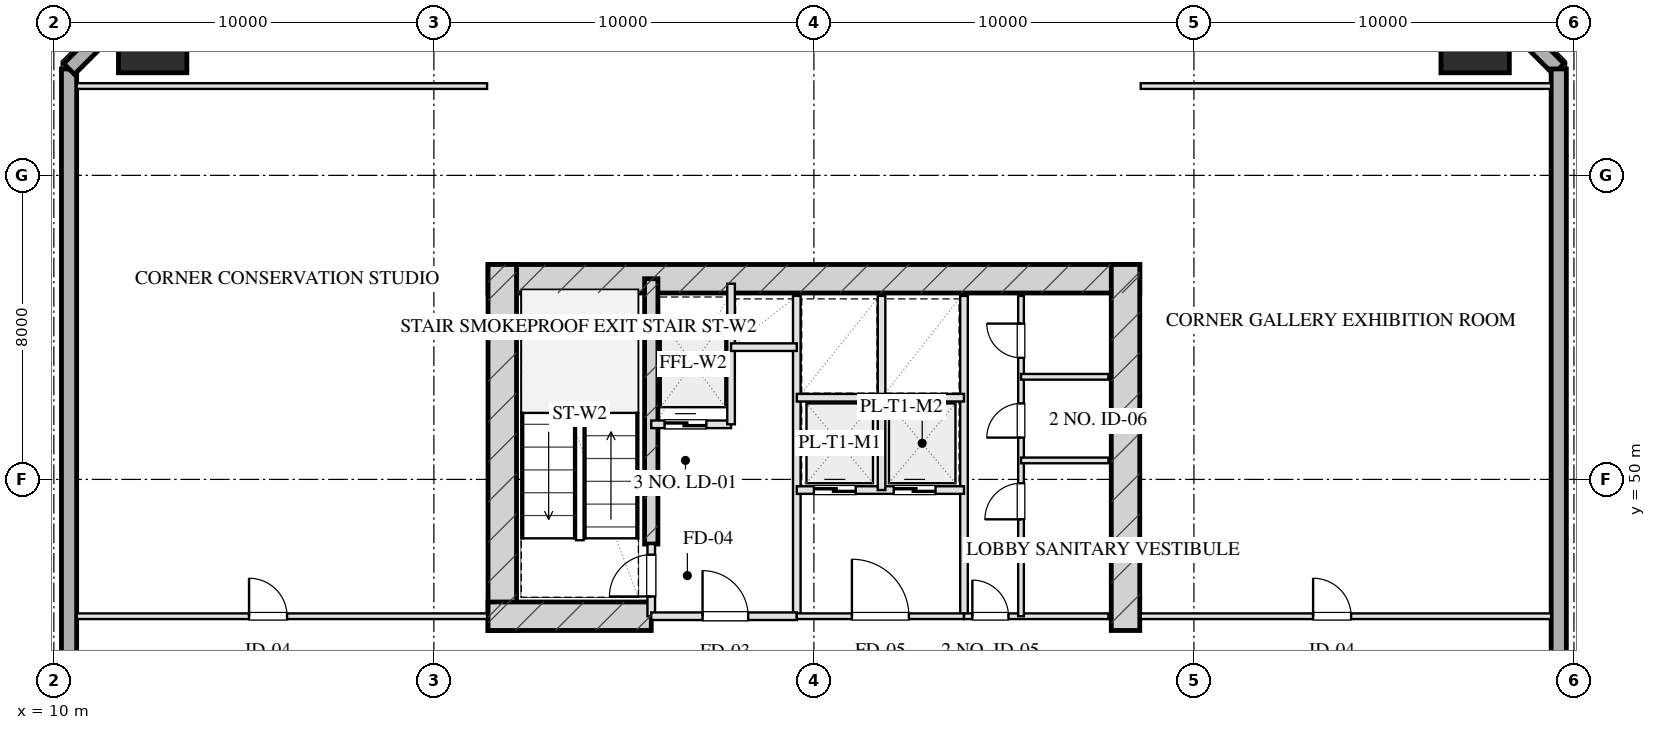
"""IFC4 building model, lengths in metres.
Left out: names, types, materials, properties, quantities, classifications, styles, units other than length and angle.
Written with IfcOpenShell. Run it as: python <this file> out.ifc"""

import sys

from ifc_helpers import new_model, si_unit, direction, frame, frame_2d, origin, origin_2d, place, context, subcontext, project, spatial, rectangle, hollow_rectangle, extrude, element, fill, save


model = new_model("IFC4")
c1 = context("Model", 3, precision=1e-05, world=origin(), true_north=direction((0.0, 1.0)))
c2 = subcontext(c1, "Body", "Model", "MODEL_VIEW")
j1 = project(units=[si_unit("LENGTHUNIT", "METRE"), si_unit("PLANEANGLEUNIT", "RADIAN")], contexts=[c1])
p1 = place(None, origin())
s1 = spatial("IfcSite", under=j1, at=p1, CompositionType="ELEMENT")
p2 = place(p1, origin())
s2 = spatial("IfcBuilding", under=s1, at=p2, CompositionType="ELEMENT")
p3 = place(p2, frame((0.0, 0.0, 30.0)))
s3 = spatial("IfcBuildingStorey", under=s2, at=p3, CompositionType="ELEMENT", Elevation=30.0)
p4 = place(p3, frame((21.425, 55.28, 0.0), z_axis=(0.0, 0.0, 1.0), x_axis=(1.0, 0.0, 0.0)))
e1 = element("IfcWall", 1, at=p4, inside=s3, PredefinedType="SHEAR", context=c2, shape_type="SweptSolid", body=[
    extrude(rectangle(XDim=17.15, YDim=0.75, at=frame_2d((8.575, 0.0))), origin(), (0.0, 0.0, 1.0), 4.0),
])
for number, where, z_axis, x_axis in (
    (2, (21.8, 46.025, 0.0), (0.0, 0.0, 1.0), (0.0, 1.0, 0.0)),
    (3, (38.2, 46.025, 0.0), (0.0, 0.0, 1.0), (0.0, 1.0, 0.0)),
):
    element("IfcWall", number, at=place(p3, frame(where, z_axis=z_axis, x_axis=x_axis)), inside=s3, PredefinedType="SHEAR", context=c2, shape_type="SweptSolid", body=[
        extrude(rectangle(XDim=9.63, YDim=0.75, at=frame_2d((4.815, 0.0))), origin(), (0.0, 0.0, 1.0), 4.0),
    ])
p5 = place(p3, frame((25.72, 48.3, 0.0), z_axis=(0.0, 0.0, 1.0), x_axis=(0.0, 1.0, 0.0)))
e4 = element("IfcWall", 4, at=p5, inside=s3, PredefinedType="SHEAR", context=c2, shape_type="SweptSolid", body=[
    extrude(rectangle(XDim=6.98, YDim=0.35, at=frame_2d((3.49, 0.0))), origin(), (0.0, 0.0, 1.0), 4.0),
])
p6 = place(p3, frame((21.425, 46.4, 0.0), z_axis=(0.0, 0.0, 1.0), x_axis=(1.0, 0.0, 0.0)))
e5 = element("IfcWall", 5, at=p6, inside=s3, PredefinedType="SHEAR", context=c2, shape_type="SweptSolid", body=[
    extrude(rectangle(XDim=4.295, YDim=0.75, at=frame_2d((2.147, 0.0))), origin(), (0.0, 0.0, 1.0), 4.0),
])
for number, where, z_axis, x_axis in (
    (6, (47.4, 61.6, 0.0), (0.0, 0.0, 1.0), (1.0, 0.0, 0.0)),
    (7, (12.6, 61.6, 0.0), (0.0, 0.0, 1.0), (1.0, 0.0, 0.0)),
):
    element("IfcColumn", number, at=place(p3, frame(where, z_axis=z_axis, x_axis=x_axis)), inside=s3, PredefinedType="COLUMN", context=c2, shape_type="SweptSolid", body=[
        extrude(hollow_rectangle(XDim=1.8, YDim=1.8, WallThickness=0.06, at=origin_2d()), origin(), (0.0, 0.0, 1.0), 4.001),
    ])
p7 = place(p3, frame((10.4, 7.2, 0.0), z_axis=(0.0, 0.0, 1.0), x_axis=(0.0, 1.0, 0.0)))
e8 = element("IfcWall", 8, at=p7, inside=s3, PredefinedType="SOLIDWALL", context=c2, shape_type="SweptSolid", body=[
    extrude(rectangle(XDim=53.6, YDim=0.4, at=frame_2d((26.8, 0.0))), origin(), (0.0, 0.0, 1.0), 3.16),
])
p8 = place(p7, frame((22.95, 0.0, 0.75)))
e9 = element("IfcOpeningElement", 9, at=p8, cuts=e8, PredefinedType="OPENING", context=c2, shape_type="SweptSolid", body=[
    extrude(rectangle(XDim=2.5, YDim=1.75, at=frame_2d((1.25, 0.875))), frame((0.0, 0.21, 0.0), z_axis=(0.0, -1.0, 0.0), x_axis=(1.0, 0.0, 0.0)), (0.0, 0.0, 1.0), 0.42),
])
p9 = place(p7, frame((28.15, 0.0, 0.75)))
e10 = element("IfcOpeningElement", 10, at=p9, cuts=e8, PredefinedType="OPENING", context=c2, shape_type="SweptSolid", body=[
    extrude(rectangle(XDim=2.5, YDim=1.75, at=frame_2d((1.25, 0.875))), frame((0.0, 0.21, 0.0), z_axis=(0.0, -1.0, 0.0), x_axis=(1.0, 0.0, 0.0)), (0.0, 0.0, 1.0), 0.42),
])
for number, where, z_axis, x_axis in (
    (11, (10.4, 60.8, 0.0), (0.0, 0.0, 1.0), (0.707, 0.707, 0.0)),
    (12, (46.6, 63.8, 0.0), (0.0, 0.0, 1.0), (0.707, -0.707, 0.0)),
):
    element("IfcWall", number, at=place(p3, frame(where, z_axis=z_axis, x_axis=x_axis)), inside=s3, PredefinedType="SOLIDWALL", context=c2, shape_type="SweptSolid", body=[
        extrude(rectangle(XDim=4.243, YDim=0.4, at=frame_2d((2.121, 0.0))), origin(), (0.0, 0.0, 1.0), 3.16),
    ])
p10 = place(p3, frame((49.6, 60.8, 0.0), z_axis=(0.0, 0.0, 1.0), x_axis=(0.0, -1.0, 0.0)))
e13 = element("IfcWall", 13, at=p10, inside=s3, PredefinedType="SOLIDWALL", context=c2, shape_type="SweptSolid", body=[
    extrude(rectangle(XDim=53.6, YDim=0.4, at=frame_2d((26.8, 0.0))), origin(), (0.0, 0.0, 1.0), 3.16),
])
p11 = place(p10, frame((28.15, 0.0, 0.75)))
e14 = element("IfcOpeningElement", 14, at=p11, cuts=e13, PredefinedType="OPENING", context=c2, shape_type="SweptSolid", body=[
    extrude(rectangle(XDim=2.5, YDim=1.75, at=frame_2d((1.25, 0.875))), frame((0.0, 0.21, 0.0), z_axis=(0.0, -1.0, 0.0), x_axis=(1.0, 0.0, 0.0)), (0.0, 0.0, 1.0), 0.42),
])
p12 = place(p10, frame((22.95, 0.0, 0.75)))
e15 = element("IfcOpeningElement", 15, at=p12, cuts=e13, PredefinedType="OPENING", context=c2, shape_type="SweptSolid", body=[
    extrude(rectangle(XDim=2.5, YDim=1.75, at=frame_2d((1.25, 0.875))), frame((0.0, 0.21, 0.0), z_axis=(0.0, -1.0, 0.0), x_axis=(1.0, 0.0, 0.0)), (0.0, 0.0, 1.0), 0.42),
])
p13 = place(p3, frame((25.72, 46.4, 0.0), z_axis=(0.0, 0.0, 1.0), x_axis=(0.0, 1.0, 0.0)))
e16 = element("IfcWall", 16, at=p13, inside=s3, PredefinedType="PARTITIONING", context=c2, shape_type="SweptSolid", body=[
    extrude(rectangle(XDim=1.9, YDim=0.2, at=frame_2d((0.95, 0.0))), origin(), (0.0, 0.0, 1.0), 3.725),
])
p14 = place(p13, frame((0.52, 0.0, 0.0)))
e17 = element("IfcOpeningElement", 17, at=p14, cuts=e16, PredefinedType="OPENING", context=c2, shape_type="SweptSolid", body=[
    extrude(rectangle(XDim=1.1, YDim=2.05, at=frame_2d((0.55, 1.025))), frame((0.0, 0.11, 0.0), z_axis=(0.0, -1.0, 0.0), x_axis=(1.0, 0.0, 0.0)), (0.0, 0.0, 1.0), 0.22),
])
p15 = place(p3, frame((29.55, 46.4, 0.0), z_axis=(0.0, 0.0, 1.0), x_axis=(0.0, 1.0, 0.0)))
e18 = element("IfcWall", 18, at=p15, inside=s3, PredefinedType="PARTITIONING", context=c2, shape_type="SweptSolid", body=[
    extrude(rectangle(XDim=8.43, YDim=0.2, at=frame_2d((4.215, 0.0))), origin(), (0.0, 0.0, 1.0), 3.725),
])
p16 = place(p3, frame((25.72, 46.4, 0.0), z_axis=(0.0, 0.0, 1.0), x_axis=(1.0, 0.0, 0.0)))
e19 = element("IfcWall", 19, at=p16, inside=s3, PredefinedType="PARTITIONING", context=c2, shape_type="SweptSolid", body=[
    extrude(rectangle(XDim=3.83, YDim=0.2, at=frame_2d((1.915, 0.0))), origin(), (0.0, 0.0, 1.0), 3.725),
])
p17 = place(p16, frame((1.35, 0.0, 0.0)))
e20 = element("IfcOpeningElement", 20, at=p17, cuts=e19, PredefinedType="OPENING", context=c2, shape_type="SweptSolid", body=[
    extrude(rectangle(XDim=1.2, YDim=2.05, at=frame_2d((0.6, 1.025))), frame((0.0, 0.11, 0.0), z_axis=(0.0, -1.0, 0.0), x_axis=(1.0, 0.0, 0.0)), (0.0, 0.0, 1.0), 0.22),
])
p18 = place(p3, frame((25.72, 51.45, 0.0), z_axis=(0.0, 0.0, 1.0), x_axis=(1.0, 0.0, 0.0)))
e21 = element("IfcWall", 21, at=p18, inside=s3, PredefinedType="PARTITIONING", context=c2, shape_type="SweptSolid", body=[
    extrude(rectangle(XDim=2.1, YDim=0.2, at=frame_2d((1.05, 0.0))), origin(), (0.0, 0.0, 1.0), 3.725),
])
p19 = place(p18, frame((0.35, 0.0, 0.0)))
e22 = element("IfcOpeningElement", 22, at=p19, cuts=e21, PredefinedType="OPENING", context=c2, shape_type="SweptSolid", body=[
    extrude(rectangle(XDim=1.1, YDim=2.05, at=frame_2d((0.55, 1.025))), frame((0.0, 0.11, 0.0), z_axis=(0.0, -1.0, 0.0), x_axis=(1.0, 0.0, 0.0)), (0.0, 0.0, 1.0), 0.22),
])
p20 = place(p3, frame((27.82, 51.45, 0.0), z_axis=(0.0, 0.0, 1.0), x_axis=(0.0, 1.0, 0.0)))
e23 = element("IfcWall", 23, at=p20, inside=s3, PredefinedType="PARTITIONING", context=c2, shape_type="SweptSolid", body=[
    extrude(rectangle(XDim=3.7, YDim=0.2, at=frame_2d((1.85, 0.0))), origin(), (0.0, 0.0, 1.0), 3.725),
])
p21 = place(p3, frame((27.82, 53.48, 0.0), z_axis=(0.0, 0.0, 1.0), x_axis=(1.0, 0.0, 0.0)))
e24 = element("IfcWall", 24, at=p21, inside=s3, PredefinedType="PARTITIONING", context=c2, shape_type="SweptSolid", body=[
    extrude(rectangle(XDim=1.73, YDim=0.2, at=frame_2d((0.865, 0.0))), origin(), (0.0, 0.0, 1.0), 3.725),
])
p22 = place(p3, frame((33.95, 46.4, 0.0), z_axis=(0.0, 0.0, 1.0), x_axis=(0.0, 1.0, 0.0)))
e25 = element("IfcWall", 25, at=p22, inside=s3, PredefinedType="PARTITIONING", context=c2, shape_type="SweptSolid", body=[
    extrude(rectangle(XDim=8.43, YDim=0.2, at=frame_2d((4.215, 0.0))), origin(), (0.0, 0.0, 1.0), 3.725),
])
p23 = place(p3, frame((29.55, 46.4, 0.0), z_axis=(0.0, 0.0, 1.0), x_axis=(1.0, 0.0, 0.0)))
e26 = element("IfcWall", 26, at=p23, inside=s3, PredefinedType="PARTITIONING", context=c2, shape_type="SweptSolid", body=[
    extrude(rectangle(XDim=4.4, YDim=0.15, at=frame_2d((2.2, 0.0))), origin(), (0.0, 0.0, 1.0), 3.725),
])
p24 = place(p23, frame((1.45, 0.0, 0.0)))
e27 = element("IfcOpeningElement", 27, at=p24, cuts=e26, PredefinedType="OPENING", context=c2, shape_type="SweptSolid", body=[
    extrude(rectangle(XDim=1.5, YDim=2.05, at=frame_2d((0.75, 1.025))), frame((0.0, 0.085, 0.0), z_axis=(0.0, -1.0, 0.0), x_axis=(1.0, 0.0, 0.0)), (0.0, 0.0, 1.0), 0.17),
])
p25 = place(p3, frame((29.55, 49.72, 0.0), z_axis=(0.0, 0.0, 1.0), x_axis=(1.0, 0.0, 0.0)))
e28 = element("IfcWall", 28, at=p25, inside=s3, PredefinedType="PARTITIONING", context=c2, shape_type="SweptSolid", body=[
    extrude(rectangle(XDim=4.4, YDim=0.2, at=frame_2d((2.2, 0.0))), origin(), (0.0, 0.0, 1.0), 3.725),
])
p26 = place(p25, frame((0.45, 0.0, 0.0)))
e29 = element("IfcOpeningElement", 29, at=p26, cuts=e28, PredefinedType="OPENING", context=c2, shape_type="SweptSolid", body=[
    extrude(rectangle(XDim=1.1, YDim=2.05, at=frame_2d((0.55, 1.025))), frame((0.0, 0.11, 0.0), z_axis=(0.0, -1.0, 0.0), x_axis=(1.0, 0.0, 0.0)), (0.0, 0.0, 1.0), 0.22),
])
p27 = place(p25, frame((2.55, 0.0, 0.0)))
e30 = element("IfcOpeningElement", 30, at=p27, cuts=e28, PredefinedType="OPENING", context=c2, shape_type="SweptSolid", body=[
    extrude(rectangle(XDim=1.1, YDim=2.05, at=frame_2d((0.55, 1.025))), frame((0.0, 0.11, 0.0), z_axis=(0.0, -1.0, 0.0), x_axis=(1.0, 0.0, 0.0)), (0.0, 0.0, 1.0), 0.22),
])
p28 = place(p3, frame((31.78, 49.72, 0.0), z_axis=(0.0, 0.0, 1.0), x_axis=(0.0, 1.0, 0.0)))
e31 = element("IfcWall", 31, at=p28, inside=s3, PredefinedType="PARTITIONING", context=c2, shape_type="SweptSolid", body=[
    extrude(rectangle(XDim=5.11, YDim=0.2, at=frame_2d((2.555, 0.0))), origin(), (0.0, 0.0, 1.0), 3.725),
])
p29 = place(p3, frame((29.55, 52.15, 0.0), z_axis=(0.0, 0.0, 1.0), x_axis=(1.0, 0.0, 0.0)))
e32 = element("IfcWall", 32, at=p29, inside=s3, PredefinedType="PARTITIONING", context=c2, shape_type="SweptSolid", body=[
    extrude(rectangle(XDim=4.4, YDim=0.2, at=frame_2d((2.2, 0.0))), origin(), (0.0, 0.0, 1.0), 3.725),
])
p30 = place(p3, frame((33.95, 46.4, 0.0), z_axis=(0.0, 0.0, 1.0), x_axis=(1.0, 0.0, 0.0)))
e33 = element("IfcWall", 33, at=p30, inside=s3, PredefinedType="PARTITIONING", context=c2, shape_type="SweptSolid", body=[
    extrude(rectangle(XDim=3.8, YDim=0.15, at=frame_2d((1.9, 0.0))), origin(), (0.0, 0.0, 1.0), 3.725),
])
p31 = place(p30, frame((0.22, 0.0, 0.0)))
e34 = element("IfcOpeningElement", 34, at=p31, cuts=e33, PredefinedType="OPENING", context=c2, shape_type="SweptSolid", body=[
    extrude(rectangle(XDim=0.95, YDim=2.05, at=frame_2d((0.475, 1.025))), frame((0.0, 0.085, 0.0), z_axis=(0.0, -1.0, 0.0), x_axis=(1.0, 0.0, 0.0)), (0.0, 0.0, 1.0), 0.17),
])
p32 = place(p3, frame((35.45, 46.4, 0.0), z_axis=(0.0, 0.0, 1.0), x_axis=(0.0, 1.0, 0.0)))
e35 = element("IfcWall", 35, at=p32, inside=s3, PredefinedType="PARTITIONING", context=c2, shape_type="SweptSolid", body=[
    extrude(rectangle(XDim=8.43, YDim=0.15, at=frame_2d((4.215, 0.0))), origin(), (0.0, 0.0, 1.0), 3.315),
])
p33 = place(p32, frame((2.55, 0.0, 0.0)))
e36 = element("IfcOpeningElement", 36, at=p33, cuts=e35, PredefinedType="OPENING", context=c2, shape_type="SweptSolid", body=[
    extrude(rectangle(XDim=0.95, YDim=2.05, at=frame_2d((0.475, 1.025))), frame((0.0, 0.085, 0.0), z_axis=(0.0, -1.0, 0.0), x_axis=(1.0, 0.0, 0.0)), (0.0, 0.0, 1.0), 0.17),
])
p34 = place(p32, frame((4.7, 0.0, 0.0)))
e37 = element("IfcOpeningElement", 37, at=p34, cuts=e35, PredefinedType="OPENING", context=c2, shape_type="SweptSolid", body=[
    extrude(rectangle(XDim=0.9, YDim=2.05, at=frame_2d((0.45, 1.025))), frame((0.0, 0.085, 0.0), z_axis=(0.0, -1.0, 0.0), x_axis=(1.0, 0.0, 0.0)), (0.0, 0.0, 1.0), 0.17),
])
p35 = place(p32, frame((6.8, 0.0, 0.0)))
e38 = element("IfcOpeningElement", 38, at=p35, cuts=e35, PredefinedType="OPENING", context=c2, shape_type="SweptSolid", body=[
    extrude(rectangle(XDim=0.9, YDim=2.05, at=frame_2d((0.45, 1.025))), frame((0.0, 0.085, 0.0), z_axis=(0.0, -1.0, 0.0), x_axis=(1.0, 0.0, 0.0)), (0.0, 0.0, 1.0), 0.17),
])
for number, where, z_axis, x_axis in (
    (39, (35.45, 50.5, 0.0), (0.0, 0.0, 1.0), (1.0, 0.0, 0.0)),
    (40, (35.45, 52.7, 0.0), (0.0, 0.0, 1.0), (1.0, 0.0, 0.0)),
):
    element("IfcWall", number, at=place(p3, frame(where, z_axis=z_axis, x_axis=x_axis)), inside=s3, PredefinedType="PARTITIONING", context=c2, shape_type="SweptSolid", body=[
        extrude(rectangle(XDim=2.3, YDim=0.15, at=frame_2d((1.15, 0.0))), origin(), (0.0, 0.0, 1.0), 3.725),
    ])
p36 = place(p3, frame((10.6, 60.35, 0.0), z_axis=(0.0, 0.0, 1.0), x_axis=(1.0, 0.0, 0.0)))
e41 = element("IfcWall", 41, at=p36, inside=s3, PredefinedType="PARTITIONING", context=c2, shape_type="SweptSolid", body=[
    extrude(rectangle(XDim=10.8, YDim=0.15, at=frame_2d((5.4, 0.0))), origin(), (0.0, 0.0, 1.0), 3.725),
])
p37 = place(p3, frame((10.6, 46.4, 0.0), z_axis=(0.0, 0.0, 1.0), x_axis=(1.0, 0.0, 0.0)))
e42 = element("IfcWall", 42, at=p37, inside=s3, PredefinedType="PARTITIONING", context=c2, shape_type="SweptSolid", body=[
    extrude(rectangle(XDim=10.8, YDim=0.15, at=frame_2d((5.4, 0.0))), origin(), (0.0, 0.0, 1.0), 3.725),
])
p38 = place(p37, frame((4.536, 0.0, 0.0)))
e43 = element("IfcOpeningElement", 43, at=p38, cuts=e42, PredefinedType="OPENING", context=c2, shape_type="SweptSolid", body=[
    extrude(rectangle(XDim=1.0, YDim=2.05, at=frame_2d((0.5, 1.025))), frame((0.0, 0.085, 0.0), z_axis=(0.0, -1.0, 0.0), x_axis=(1.0, 0.0, 0.0)), (0.0, 0.0, 1.0), 0.17),
])
p39 = place(p3, frame((38.6, 60.35, 0.0), z_axis=(0.0, 0.0, 1.0), x_axis=(1.0, 0.0, 0.0)))
e44 = element("IfcWall", 44, at=p39, inside=s3, PredefinedType="PARTITIONING", context=c2, shape_type="SweptSolid", body=[
    extrude(rectangle(XDim=10.8, YDim=0.15, at=frame_2d((5.4, 0.0))), origin(), (0.0, 0.0, 1.0), 3.725),
])
p40 = place(p3, frame((38.6, 46.4, 0.0), z_axis=(0.0, 0.0, 1.0), x_axis=(1.0, 0.0, 0.0)))
e45 = element("IfcWall", 45, at=p40, inside=s3, PredefinedType="PARTITIONING", context=c2, shape_type="SweptSolid", body=[
    extrude(rectangle(XDim=10.8, YDim=0.15, at=frame_2d((5.4, 0.0))), origin(), (0.0, 0.0, 1.0), 3.725),
])
p41 = place(p40, frame((4.536, 0.0, 0.0)))
e46 = element("IfcOpeningElement", 46, at=p41, cuts=e45, PredefinedType="OPENING", context=c2, shape_type="SweptSolid", body=[
    extrude(rectangle(XDim=1.0, YDim=2.05, at=frame_2d((0.5, 1.025))), frame((0.0, 0.085, 0.0), z_axis=(0.0, -1.0, 0.0), x_axis=(1.0, 0.0, 0.0)), (0.0, 0.0, 1.0), 0.17),
])
p42 = place(p14, origin())
e47 = element("IfcDoor", 47, at=p42, inside=s3, OperationType="SINGLE_SWING_LEFT", PredefinedType="DOOR", context=c2, shape_type="SweptSolid", body=[
    extrude(rectangle(XDim=1.1, YDim=2.05, at=frame_2d((0.55, 1.025))), frame((0.0, 0.025, 0.0), z_axis=(0.0, -1.0, 0.0), x_axis=(1.0, 0.0, 0.0)), (0.0, 0.0, 1.0), 0.05),
])
fill(e17, e47)
p43 = place(p17, origin())
e48 = element("IfcDoor", 48, at=p43, inside=s3, OperationType="SINGLE_SWING_LEFT", PredefinedType="DOOR", context=c2, shape_type="SweptSolid", body=[
    extrude(rectangle(XDim=1.2, YDim=2.05, at=frame_2d((0.6, 1.025))), frame((0.0, 0.025, 0.0), z_axis=(0.0, -1.0, 0.0), x_axis=(1.0, 0.0, 0.0)), (0.0, 0.0, 1.0), 0.05),
])
fill(e20, e48)
p44 = place(p19, origin())
e49 = element("IfcDoor", 49, at=p44, inside=s3, OperationType="DOUBLE_DOOR_SLIDING", PredefinedType="DOOR", context=c2, shape_type="SweptSolid", body=[
    extrude(rectangle(XDim=1.1, YDim=2.05, at=frame_2d((0.55, 1.025))), frame((0.0, 0.025, 0.0), z_axis=(0.0, -1.0, 0.0), x_axis=(1.0, 0.0, 0.0)), (0.0, 0.0, 1.0), 0.05),
])
fill(e22, e49)
p45 = place(p24, origin())
e50 = element("IfcDoor", 50, at=p45, inside=s3, OperationType="SINGLE_SWING_LEFT", PredefinedType="DOOR", context=c2, shape_type="SweptSolid", body=[
    extrude(rectangle(XDim=1.5, YDim=2.05, at=frame_2d((0.75, 1.025))), frame((0.0, 0.025, 0.0), z_axis=(0.0, -1.0, 0.0), x_axis=(1.0, 0.0, 0.0)), (0.0, 0.0, 1.0), 0.05),
])
fill(e27, e50)
p46 = place(p26, origin())
e51 = element("IfcDoor", 51, at=p46, inside=s3, OperationType="DOUBLE_DOOR_SLIDING", PredefinedType="DOOR", context=c2, shape_type="SweptSolid", body=[
    extrude(rectangle(XDim=1.1, YDim=2.05, at=frame_2d((0.55, 1.025))), frame((0.0, 0.025, 0.0), z_axis=(0.0, -1.0, 0.0), x_axis=(1.0, 0.0, 0.0)), (0.0, 0.0, 1.0), 0.05),
])
fill(e29, e51)
p47 = place(p27, origin())
e52 = element("IfcDoor", 52, at=p47, inside=s3, OperationType="DOUBLE_DOOR_SLIDING", PredefinedType="DOOR", context=c2, shape_type="SweptSolid", body=[
    extrude(rectangle(XDim=1.1, YDim=2.05, at=frame_2d((0.55, 1.025))), frame((0.0, 0.025, 0.0), z_axis=(0.0, -1.0, 0.0), x_axis=(1.0, 0.0, 0.0)), (0.0, 0.0, 1.0), 0.05),
])
fill(e30, e52)
p48 = place(p31, origin())
e53 = element("IfcDoor", 53, at=p48, inside=s3, OperationType="SINGLE_SWING_LEFT", PredefinedType="DOOR", context=c2, shape_type="SweptSolid", body=[
    extrude(rectangle(XDim=0.95, YDim=2.05, at=frame_2d((0.475, 1.025))), frame((0.0, 0.025, 0.0), z_axis=(0.0, -1.0, 0.0), x_axis=(1.0, 0.0, 0.0)), (0.0, 0.0, 1.0), 0.05),
])
fill(e34, e53)
p49 = place(p33, origin())
e54 = element("IfcDoor", 54, at=p49, inside=s3, OperationType="SINGLE_SWING_LEFT", PredefinedType="DOOR", context=c2, shape_type="SweptSolid", body=[
    extrude(rectangle(XDim=0.95, YDim=2.05, at=frame_2d((0.475, 1.025))), frame((0.0, 0.025, 0.0), z_axis=(0.0, -1.0, 0.0), x_axis=(1.0, 0.0, 0.0)), (0.0, 0.0, 1.0), 0.05),
])
fill(e36, e54)
p50 = place(p34, origin())
e55 = element("IfcDoor", 55, at=p50, inside=s3, OperationType="SINGLE_SWING_LEFT", PredefinedType="DOOR", context=c2, shape_type="SweptSolid", body=[
    extrude(rectangle(XDim=0.9, YDim=2.05, at=frame_2d((0.45, 1.025))), frame((0.0, 0.025, 0.0), z_axis=(0.0, -1.0, 0.0), x_axis=(1.0, 0.0, 0.0)), (0.0, 0.0, 1.0), 0.05),
])
fill(e37, e55)
p51 = place(p35, origin())
e56 = element("IfcDoor", 56, at=p51, inside=s3, OperationType="SINGLE_SWING_RIGHT", PredefinedType="DOOR", context=c2, shape_type="SweptSolid", body=[
    extrude(rectangle(XDim=0.9, YDim=2.05, at=frame_2d((0.45, 1.025))), frame((0.0, 0.025, 0.0), z_axis=(0.0, -1.0, 0.0), x_axis=(1.0, 0.0, 0.0)), (0.0, 0.0, 1.0), 0.05),
])
fill(e38, e56)
p52 = place(p38, origin())
e57 = element("IfcDoor", 57, at=p52, inside=s3, OperationType="SINGLE_SWING_LEFT", PredefinedType="DOOR", context=c2, shape_type="SweptSolid", body=[
    extrude(rectangle(XDim=1.0, YDim=2.05, at=frame_2d((0.5, 1.025))), frame((0.0, 0.025, 0.0), z_axis=(0.0, -1.0, 0.0), x_axis=(1.0, 0.0, 0.0)), (0.0, 0.0, 1.0), 0.05),
])
fill(e43, e57)
p53 = place(p41, origin())
e58 = element("IfcDoor", 58, at=p53, inside=s3, OperationType="SINGLE_SWING_LEFT", PredefinedType="DOOR", context=c2, shape_type="SweptSolid", body=[
    extrude(rectangle(XDim=1.0, YDim=2.05, at=frame_2d((0.5, 1.025))), frame((0.0, 0.025, 0.0), z_axis=(0.0, -1.0, 0.0), x_axis=(1.0, 0.0, 0.0)), (0.0, 0.0, 1.0), 0.05),
])
fill(e46, e58)
save(model, sys.argv[1])
